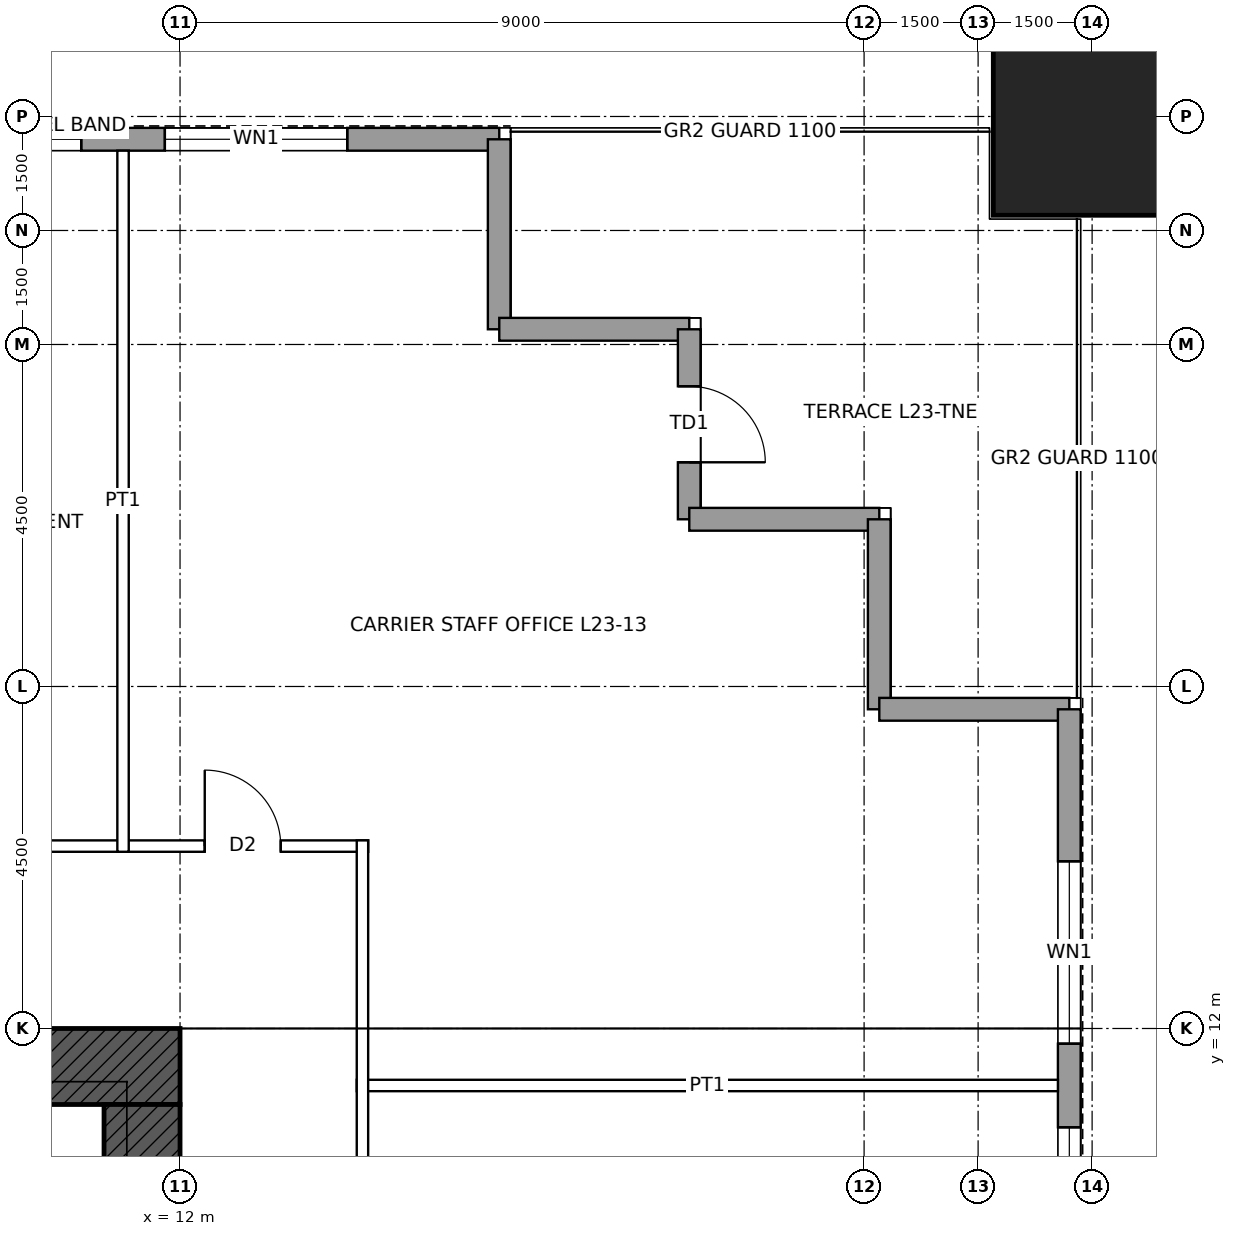
"""IFC4 building model, lengths in metres.
Left out: names, types, materials, properties, quantities, classifications, styles, units other than length and angle.
Written with IfcOpenShell. Run it as: python <this file> out.ifc"""

import sys

from ifc_helpers import new_model, si_unit, direction, frame, frame_2d, origin, origin_2d, place, context, subcontext, project, spatial, rectangle, hollow_rectangle, extrude, element, fill, save


model = new_model("IFC4")
c1 = context("Model", 3, precision=1e-05, world=origin(), true_north=direction((0.0, 1.0)))
c2 = subcontext(c1, "Body", "Model", "MODEL_VIEW")
j1 = project(units=[si_unit("LENGTHUNIT", "METRE"), si_unit("PLANEANGLEUNIT", "RADIAN")], contexts=[c1])
p1 = place(None, origin())
s1 = spatial("IfcSite", under=j1, at=p1, CompositionType="ELEMENT")
p2 = place(p1, origin())
s2 = spatial("IfcBuilding", under=s1, at=p2, CompositionType="ELEMENT")
p3 = place(p2, frame((0.0, 0.0, 117.9)))
s3 = spatial("IfcBuildingStorey", under=s2, at=p3, CompositionType="ELEMENT", Elevation=117.9)
p4 = place(p3, frame((24.0, 24.0, 0.0), z_axis=(0.0, 0.0, 1.0), x_axis=(1.0, 0.0, 0.0)))
e1 = element("IfcColumn", 1, at=p4, inside=s3, PredefinedType="COLUMN", context=c2, shape_type="SweptSolid", body=[
    extrude(hollow_rectangle(XDim=2.6, YDim=2.6, WallThickness=0.13, at=origin_2d()), origin(), (0.0, 0.0, 1.0), 4.5),
])
p5 = place(p3, frame((-12.0, 11.5, 0.0), z_axis=(0.0, 0.0, 1.0), x_axis=(1.0, 0.0, 0.0)))
e2 = element("IfcWall", 2, at=p5, inside=s3, PredefinedType="SHEAR", context=c2, shape_type="SweptSolid", body=[
    extrude(rectangle(XDim=24.0, YDim=1.0, at=frame_2d((12.0, 0.0))), origin(), (0.0, 0.0, 1.0), 4.5),
])
p6 = place(p5, frame((6.25, 0.0, 0.0)))
e3 = element("IfcOpeningElement", 3, at=p6, cuts=e2, PredefinedType="OPENING", context=c2, shape_type="SweptSolid", body=[
    extrude(rectangle(XDim=1.0, YDim=2.4, at=frame_2d((0.5, 1.2))), frame((0.0, 0.51, 0.0), z_axis=(0.0, -1.0, 0.0), x_axis=(1.0, 0.0, 0.0)), (0.0, 0.0, 1.0), 1.02),
])
p7 = place(p5, frame((16.75, 0.0, 0.0)))
e4 = element("IfcOpeningElement", 4, at=p7, cuts=e2, PredefinedType="OPENING", context=c2, shape_type="SweptSolid", body=[
    extrude(rectangle(XDim=1.0, YDim=2.4, at=frame_2d((0.5, 1.2))), frame((0.0, 0.51, 0.0), z_axis=(0.0, -1.0, 0.0), x_axis=(1.0, 0.0, 0.0)), (0.0, 0.0, 1.0), 1.02),
])
p8 = place(p3, frame((11.5, 11.0, 0.0), z_axis=(0.0, 0.0, 1.0), x_axis=(0.0, -1.0, 0.0)))
e5 = element("IfcWall", 5, at=p8, inside=s3, PredefinedType="SHEAR", context=c2, shape_type="SweptSolid", body=[
    extrude(rectangle(XDim=22.0, YDim=1.0, at=frame_2d((11.0, 0.0))), origin(), (0.0, 0.0, 1.0), 4.5),
])
p9 = place(p8, frame((10.5, 0.0, 0.0)))
e6 = element("IfcOpeningElement", 6, at=p9, cuts=e5, PredefinedType="OPENING", context=c2, shape_type="SweptSolid", body=[
    extrude(rectangle(XDim=1.0, YDim=2.4, at=frame_2d((0.5, 1.2))), frame((0.0, 0.51, 0.0), z_axis=(0.0, -1.0, 0.0), x_axis=(1.0, 0.0, 0.0)), (0.0, 0.0, 1.0), 1.02),
])
p10 = place(p3, frame((-16.2, 23.7, 0.0), z_axis=(0.0, 0.0, 1.0), x_axis=(1.0, 0.0, 0.0)))
e7 = element("IfcWall", 7, at=p10, inside=s3, PredefinedType="SOLIDWALL", context=c2, shape_type="SweptSolid", body=[
    extrude(rectangle(XDim=32.4, YDim=0.3, at=frame_2d((16.2, 0.0))), origin(), (0.0, 0.0, 1.0), 4.3),
])
p11 = place(p10, frame((2.0, 0.0, 1.0)))
e8 = element("IfcOpeningElement", 8, at=p11, cuts=e7, PredefinedType="OPENING", context=c2, shape_type="SweptSolid", body=[
    extrude(rectangle(XDim=2.4, YDim=1.2, at=frame_2d((1.2, 0.6))), frame((0.0, 0.16, 0.0), z_axis=(0.0, -1.0, 0.0), x_axis=(1.0, 0.0, 0.0)), (0.0, 0.0, 1.0), 0.32),
])
p12 = place(p10, frame((5.5, 0.0, 1.0)))
e9 = element("IfcOpeningElement", 9, at=p12, cuts=e7, PredefinedType="OPENING", context=c2, shape_type="SweptSolid", body=[
    extrude(rectangle(XDim=2.4, YDim=1.2, at=frame_2d((1.2, 0.6))), frame((0.0, 0.16, 0.0), z_axis=(0.0, -1.0, 0.0), x_axis=(1.0, 0.0, 0.0)), (0.0, 0.0, 1.0), 0.32),
])
p13 = place(p10, frame((8.45, 0.0, 1.0)))
e10 = element("IfcOpeningElement", 10, at=p13, cuts=e7, PredefinedType="OPENING", context=c2, shape_type="SweptSolid", body=[
    extrude(rectangle(XDim=1.8, YDim=1.2, at=frame_2d((0.9, 0.6))), frame((0.0, 0.16, 0.0), z_axis=(0.0, -1.0, 0.0), x_axis=(1.0, 0.0, 0.0)), (0.0, 0.0, 1.0), 0.32),
])
p14 = place(p10, frame((10.55, 0.0, 1.0)))
e11 = element("IfcOpeningElement", 11, at=p14, cuts=e7, PredefinedType="OPENING", context=c2, shape_type="SweptSolid", body=[
    extrude(rectangle(XDim=1.8, YDim=1.2, at=frame_2d((0.9, 0.6))), frame((0.0, 0.16, 0.0), z_axis=(0.0, -1.0, 0.0), x_axis=(1.0, 0.0, 0.0)), (0.0, 0.0, 1.0), 0.32),
])
p15 = place(p10, frame((15.6, 0.0, 1.0)))
e12 = element("IfcOpeningElement", 12, at=p15, cuts=e7, PredefinedType="OPENING", context=c2, shape_type="SweptSolid", body=[
    extrude(rectangle(XDim=1.8, YDim=1.2, at=frame_2d((0.9, 0.6))), frame((0.0, 0.16, 0.0), z_axis=(0.0, -1.0, 0.0), x_axis=(1.0, 0.0, 0.0)), (0.0, 0.0, 1.0), 0.32),
])
p16 = place(p10, frame((20.5, 0.0, 1.0)))
e13 = element("IfcOpeningElement", 13, at=p16, cuts=e7, PredefinedType="OPENING", context=c2, shape_type="SweptSolid", body=[
    extrude(rectangle(XDim=2.4, YDim=1.2, at=frame_2d((1.2, 0.6))), frame((0.0, 0.16, 0.0), z_axis=(0.0, -1.0, 0.0), x_axis=(1.0, 0.0, 0.0)), (0.0, 0.0, 1.0), 0.32),
])
p17 = place(p10, frame((24.5, 0.0, 1.0)))
e14 = element("IfcOpeningElement", 14, at=p17, cuts=e7, PredefinedType="OPENING", context=c2, shape_type="SweptSolid", body=[
    extrude(rectangle(XDim=2.4, YDim=1.2, at=frame_2d((1.2, 0.6))), frame((0.0, 0.16, 0.0), z_axis=(0.0, -1.0, 0.0), x_axis=(1.0, 0.0, 0.0)), (0.0, 0.0, 1.0), 0.32),
])
p18 = place(p10, frame((28.0, 0.0, 1.0)))
e15 = element("IfcOpeningElement", 15, at=p18, cuts=e7, PredefinedType="OPENING", context=c2, shape_type="SweptSolid", body=[
    extrude(rectangle(XDim=2.4, YDim=1.2, at=frame_2d((1.2, 0.6))), frame((0.0, 0.16, 0.0), z_axis=(0.0, -1.0, 0.0), x_axis=(1.0, 0.0, 0.0)), (0.0, 0.0, 1.0), 0.32),
])
for number, where, z_axis, x_axis in (
    (16, (16.2, 23.7, 0.0), (0.0, 0.0, 1.0), (0.0, -1.0, 0.0)),
    (17, (16.2, 21.2, 0.0), (0.0, 0.0, 1.0), (1.0, 0.0, 0.0)),
):
    element("IfcWall", number, at=place(p3, frame(where, z_axis=z_axis, x_axis=x_axis)), inside=s3, PredefinedType="SOLIDWALL", context=c2, shape_type="SweptSolid", body=[
        extrude(rectangle(XDim=2.5, YDim=0.3, at=frame_2d((1.25, 0.0))), origin(), (0.0, 0.0, 1.0), 4.3),
    ])
p19 = place(p3, frame((18.7, 21.2, 0.0), z_axis=(0.0, 0.0, 1.0), x_axis=(0.0, -1.0, 0.0)))
e18 = element("IfcWall", 18, at=p19, inside=s3, PredefinedType="SOLIDWALL", context=c2, shape_type="SweptSolid", body=[
    extrude(rectangle(XDim=2.5, YDim=0.3, at=frame_2d((1.25, 0.0))), origin(), (0.0, 0.0, 1.0), 4.3),
])
p20 = place(p19, frame((0.75, 0.0, 0.0)))
e19 = element("IfcOpeningElement", 19, at=p20, cuts=e18, PredefinedType="OPENING", context=c2, shape_type="SweptSolid", body=[
    extrude(rectangle(XDim=1.0, YDim=2.4, at=frame_2d((0.5, 1.2))), frame((0.0, 0.16, 0.0), z_axis=(0.0, -1.0, 0.0), x_axis=(1.0, 0.0, 0.0)), (0.0, 0.0, 1.0), 0.32),
])
for number, where, z_axis, x_axis in (
    (20, (18.7, 18.7, 0.0), (0.0, 0.0, 1.0), (1.0, 0.0, 0.0)),
    (21, (21.2, 18.7, 0.0), (0.0, 0.0, 1.0), (0.0, -1.0, 0.0)),
    (22, (21.2, 16.2, 0.0), (0.0, 0.0, 1.0), (1.0, 0.0, 0.0)),
):
    element("IfcWall", number, at=place(p3, frame(where, z_axis=z_axis, x_axis=x_axis)), inside=s3, PredefinedType="SOLIDWALL", context=c2, shape_type="SweptSolid", body=[
        extrude(rectangle(XDim=2.5, YDim=0.3, at=frame_2d((1.25, 0.0))), origin(), (0.0, 0.0, 1.0), 4.3),
    ])
p21 = place(p3, frame((23.7, 16.2, 0.0), z_axis=(0.0, 0.0, 1.0), x_axis=(0.0, -1.0, 0.0)))
e23 = element("IfcWall", 23, at=p21, inside=s3, PredefinedType="SOLIDWALL", context=c2, shape_type="SweptSolid", body=[
    extrude(rectangle(XDim=32.4, YDim=0.3, at=frame_2d((16.2, 0.0))), origin(), (0.0, 0.0, 1.0), 4.3),
])
p22 = place(p21, frame((2.0, 0.0, 1.0)))
e24 = element("IfcOpeningElement", 24, at=p22, cuts=e23, PredefinedType="OPENING", context=c2, shape_type="SweptSolid", body=[
    extrude(rectangle(XDim=2.4, YDim=1.2, at=frame_2d((1.2, 0.6))), frame((0.0, 0.16, 0.0), z_axis=(0.0, -1.0, 0.0), x_axis=(1.0, 0.0, 0.0)), (0.0, 0.0, 1.0), 0.32),
])
p23 = place(p21, frame((5.5, 0.0, 1.0)))
e25 = element("IfcOpeningElement", 25, at=p23, cuts=e23, PredefinedType="OPENING", context=c2, shape_type="SweptSolid", body=[
    extrude(rectangle(XDim=2.4, YDim=1.2, at=frame_2d((1.2, 0.6))), frame((0.0, 0.16, 0.0), z_axis=(0.0, -1.0, 0.0), x_axis=(1.0, 0.0, 0.0)), (0.0, 0.0, 1.0), 0.32),
])
p24 = place(p21, frame((8.45, 0.0, 1.0)))
e26 = element("IfcOpeningElement", 26, at=p24, cuts=e23, PredefinedType="OPENING", context=c2, shape_type="SweptSolid", body=[
    extrude(rectangle(XDim=1.8, YDim=1.2, at=frame_2d((0.9, 0.6))), frame((0.0, 0.16, 0.0), z_axis=(0.0, -1.0, 0.0), x_axis=(1.0, 0.0, 0.0)), (0.0, 0.0, 1.0), 0.32),
])
p25 = place(p21, frame((10.55, 0.0, 1.0)))
e27 = element("IfcOpeningElement", 27, at=p25, cuts=e23, PredefinedType="OPENING", context=c2, shape_type="SweptSolid", body=[
    extrude(rectangle(XDim=1.8, YDim=1.2, at=frame_2d((0.9, 0.6))), frame((0.0, 0.16, 0.0), z_axis=(0.0, -1.0, 0.0), x_axis=(1.0, 0.0, 0.0)), (0.0, 0.0, 1.0), 0.32),
])
p26 = place(p21, frame((15.6, 0.0, 1.0)))
e28 = element("IfcOpeningElement", 28, at=p26, cuts=e23, PredefinedType="OPENING", context=c2, shape_type="SweptSolid", body=[
    extrude(rectangle(XDim=1.8, YDim=1.2, at=frame_2d((0.9, 0.6))), frame((0.0, 0.16, 0.0), z_axis=(0.0, -1.0, 0.0), x_axis=(1.0, 0.0, 0.0)), (0.0, 0.0, 1.0), 0.32),
])
p27 = place(p21, frame((20.5, 0.0, 1.0)))
e29 = element("IfcOpeningElement", 29, at=p27, cuts=e23, PredefinedType="OPENING", context=c2, shape_type="SweptSolid", body=[
    extrude(rectangle(XDim=2.4, YDim=1.2, at=frame_2d((1.2, 0.6))), frame((0.0, 0.16, 0.0), z_axis=(0.0, -1.0, 0.0), x_axis=(1.0, 0.0, 0.0)), (0.0, 0.0, 1.0), 0.32),
])
p28 = place(p21, frame((24.5, 0.0, 1.0)))
e30 = element("IfcOpeningElement", 30, at=p28, cuts=e23, PredefinedType="OPENING", context=c2, shape_type="SweptSolid", body=[
    extrude(rectangle(XDim=2.4, YDim=1.2, at=frame_2d((1.2, 0.6))), frame((0.0, 0.16, 0.0), z_axis=(0.0, -1.0, 0.0), x_axis=(1.0, 0.0, 0.0)), (0.0, 0.0, 1.0), 0.32),
])
p29 = place(p21, frame((28.0, 0.0, 1.0)))
e31 = element("IfcOpeningElement", 31, at=p29, cuts=e23, PredefinedType="OPENING", context=c2, shape_type="SweptSolid", body=[
    extrude(rectangle(XDim=2.4, YDim=1.2, at=frame_2d((1.2, 0.6))), frame((0.0, 0.16, 0.0), z_axis=(0.0, -1.0, 0.0), x_axis=(1.0, 0.0, 0.0)), (0.0, 0.0, 1.0), 0.32),
])
p30 = place(p3, frame((14.325, 11.25, 0.0), z_axis=(0.0, 0.0, 1.0), x_axis=(1.0, 0.0, 0.0)))
e32 = element("IfcWall", 32, at=p30, inside=s3, PredefinedType="PARTITIONING", context=c2, shape_type="SweptSolid", body=[
    extrude(rectangle(XDim=9.225, YDim=0.15, at=frame_2d((4.613, 0.0))), origin(), (0.0, 0.0, 1.0), 3.431),
])
p31 = place(p3, frame((-14.475, 14.4, 0.0), z_axis=(0.0, 0.0, 1.0), x_axis=(1.0, 0.0, 0.0)))
e33 = element("IfcWall", 33, at=p31, inside=s3, PredefinedType="PARTITIONING", context=c2, shape_type="SweptSolid", body=[
    extrude(rectangle(XDim=28.95, YDim=0.15, at=frame_2d((14.475, 0.0))), origin(), (0.0, 0.0, 1.0), 4.3),
])
p32 = place(p31, frame((4.2, 0.0, 0.0)))
e34 = element("IfcOpeningElement", 34, at=p32, cuts=e33, PredefinedType="OPENING", context=c2, shape_type="SweptSolid", body=[
    extrude(rectangle(XDim=1.8, YDim=2.4, at=frame_2d((0.9, 1.2))), frame((0.0, 0.085, 0.0), z_axis=(0.0, -1.0, 0.0), x_axis=(1.0, 0.0, 0.0)), (0.0, 0.0, 1.0), 0.17),
])
p33 = place(p31, frame((9.825, 0.0, 0.0)))
e35 = element("IfcOpeningElement", 35, at=p33, cuts=e33, PredefinedType="OPENING", context=c2, shape_type="SweptSolid", body=[
    extrude(rectangle(XDim=1.8, YDim=2.4, at=frame_2d((0.9, 1.2))), frame((0.0, 0.085, 0.0), z_axis=(0.0, -1.0, 0.0), x_axis=(1.0, 0.0, 0.0)), (0.0, 0.0, 1.0), 0.17),
])
p34 = place(p31, frame((17.325, 0.0, 0.0)))
e36 = element("IfcOpeningElement", 36, at=p34, cuts=e33, PredefinedType="OPENING", context=c2, shape_type="SweptSolid", body=[
    extrude(rectangle(XDim=1.8, YDim=2.4, at=frame_2d((0.9, 1.2))), frame((0.0, 0.085, 0.0), z_axis=(0.0, -1.0, 0.0), x_axis=(1.0, 0.0, 0.0)), (0.0, 0.0, 1.0), 0.17),
])
p35 = place(p31, frame((22.95, 0.0, 0.0)))
e37 = element("IfcOpeningElement", 37, at=p35, cuts=e33, PredefinedType="OPENING", context=c2, shape_type="SweptSolid", body=[
    extrude(rectangle(XDim=1.8, YDim=2.4, at=frame_2d((0.9, 1.2))), frame((0.0, 0.085, 0.0), z_axis=(0.0, -1.0, 0.0), x_axis=(1.0, 0.0, 0.0)), (0.0, 0.0, 1.0), 0.17),
])
p36 = place(p31, frame((26.8, 0.0, 0.0)))
e38 = element("IfcOpeningElement", 38, at=p36, cuts=e33, PredefinedType="OPENING", context=c2, shape_type="SweptSolid", body=[
    extrude(rectangle(XDim=1.0, YDim=2.1, at=frame_2d((0.5, 1.05))), frame((0.0, 0.085, 0.0), z_axis=(0.0, -1.0, 0.0), x_axis=(1.0, 0.0, 0.0)), (0.0, 0.0, 1.0), 0.17),
])
p37 = place(p31, frame((1.15, 0.0, 0.0)))
e39 = element("IfcOpeningElement", 39, at=p37, cuts=e33, PredefinedType="OPENING", context=c2, shape_type="SweptSolid", body=[
    extrude(rectangle(XDim=1.0, YDim=2.1, at=frame_2d((0.5, 1.05))), frame((0.0, 0.085, 0.0), z_axis=(0.0, -1.0, 0.0), x_axis=(1.0, 0.0, 0.0)), (0.0, 0.0, 1.0), 0.17),
])
p38 = place(p3, frame((11.25, 14.325, 0.0), z_axis=(0.0, 0.0, 1.0), x_axis=(0.0, 1.0, 0.0)))
e40 = element("IfcWall", 40, at=p38, inside=s3, PredefinedType="PARTITIONING", context=c2, shape_type="SweptSolid", body=[
    extrude(rectangle(XDim=9.225, YDim=0.15, at=frame_2d((4.613, 0.0))), origin(), (0.0, 0.0, 1.0), 3.431),
])
p39 = place(p3, frame((14.4, -14.475, 0.0), z_axis=(0.0, 0.0, 1.0), x_axis=(0.0, 1.0, 0.0)))
e41 = element("IfcWall", 41, at=p39, inside=s3, PredefinedType="PARTITIONING", context=c2, shape_type="SweptSolid", body=[
    extrude(rectangle(XDim=28.95, YDim=0.15, at=frame_2d((14.475, 0.0))), origin(), (0.0, 0.0, 1.0), 4.3),
])
p40 = place(p39, frame((19.2, 0.0, 0.0)))
e42 = element("IfcOpeningElement", 42, at=p40, cuts=e41, PredefinedType="OPENING", context=c2, shape_type="SweptSolid", body=[
    extrude(rectangle(XDim=1.8, YDim=2.4, at=frame_2d((0.9, 1.2))), frame((0.0, 0.085, 0.0), z_axis=(0.0, -1.0, 0.0), x_axis=(1.0, 0.0, 0.0)), (0.0, 0.0, 1.0), 0.17),
])
p41 = place(p39, frame((7.95, 0.0, 0.0)))
e43 = element("IfcOpeningElement", 43, at=p41, cuts=e41, PredefinedType="OPENING", context=c2, shape_type="SweptSolid", body=[
    extrude(rectangle(XDim=1.8, YDim=2.4, at=frame_2d((0.9, 1.2))), frame((0.0, 0.085, 0.0), z_axis=(0.0, -1.0, 0.0), x_axis=(1.0, 0.0, 0.0)), (0.0, 0.0, 1.0), 0.17),
])
p42 = place(p17, origin())
e44 = element("IfcWindow", 44, at=p42, inside=s3, PartitioningType="SINGLE_PANEL", PredefinedType="WINDOW", context=c2, shape_type="SweptSolid", body=[
    extrude(rectangle(XDim=2.4, YDim=1.2, at=frame_2d((1.2, 0.6))), frame((0.0, 0.03, 0.0), z_axis=(0.0, -1.0, 0.0), x_axis=(1.0, 0.0, 0.0)), (0.0, 0.0, 1.0), 0.06),
])
fill(e14, e44)
p43 = place(p18, origin())
e45 = element("IfcWindow", 45, at=p43, inside=s3, PartitioningType="SINGLE_PANEL", PredefinedType="WINDOW", context=c2, shape_type="SweptSolid", body=[
    extrude(rectangle(XDim=2.4, YDim=1.2, at=frame_2d((1.2, 0.6))), frame((0.0, 0.03, 0.0), z_axis=(0.0, -1.0, 0.0), x_axis=(1.0, 0.0, 0.0)), (0.0, 0.0, 1.0), 0.06),
])
fill(e15, e45)
p44 = place(p20, origin())
e46 = element("IfcDoor", 46, at=p44, inside=s3, OperationType="SINGLE_SWING_RIGHT", PredefinedType="DOOR", context=c2, shape_type="SweptSolid", body=[
    extrude(rectangle(XDim=1.0, YDim=2.4, at=frame_2d((0.5, 1.2))), frame((0.0, 0.025, 0.0), z_axis=(0.0, -1.0, 0.0), x_axis=(1.0, 0.0, 0.0)), (0.0, 0.0, 1.0), 0.05),
])
fill(e19, e46)
p45 = place(p22, origin())
e47 = element("IfcWindow", 47, at=p45, inside=s3, PartitioningType="SINGLE_PANEL", PredefinedType="WINDOW", context=c2, shape_type="SweptSolid", body=[
    extrude(rectangle(XDim=2.4, YDim=1.2, at=frame_2d((1.2, 0.6))), frame((0.0, 0.03, 0.0), z_axis=(0.0, -1.0, 0.0), x_axis=(1.0, 0.0, 0.0)), (0.0, 0.0, 1.0), 0.06),
])
fill(e24, e47)
p46 = place(p23, origin())
e48 = element("IfcWindow", 48, at=p46, inside=s3, PartitioningType="SINGLE_PANEL", PredefinedType="WINDOW", context=c2, shape_type="SweptSolid", body=[
    extrude(rectangle(XDim=2.4, YDim=1.2, at=frame_2d((1.2, 0.6))), frame((0.0, 0.03, 0.0), z_axis=(0.0, -1.0, 0.0), x_axis=(1.0, 0.0, 0.0)), (0.0, 0.0, 1.0), 0.06),
])
fill(e25, e48)
p47 = place(p36, origin())
e49 = element("IfcDoor", 49, at=p47, inside=s3, OperationType="SINGLE_SWING_LEFT", PredefinedType="DOOR", context=c2, shape_type="SweptSolid", body=[
    extrude(rectangle(XDim=1.0, YDim=2.1, at=frame_2d((0.5, 1.05))), frame((0.0, 0.025, 0.0), z_axis=(0.0, -1.0, 0.0), x_axis=(1.0, 0.0, 0.0)), (0.0, 0.0, 1.0), 0.05),
])
fill(e38, e49)
save(model, sys.argv[1])
